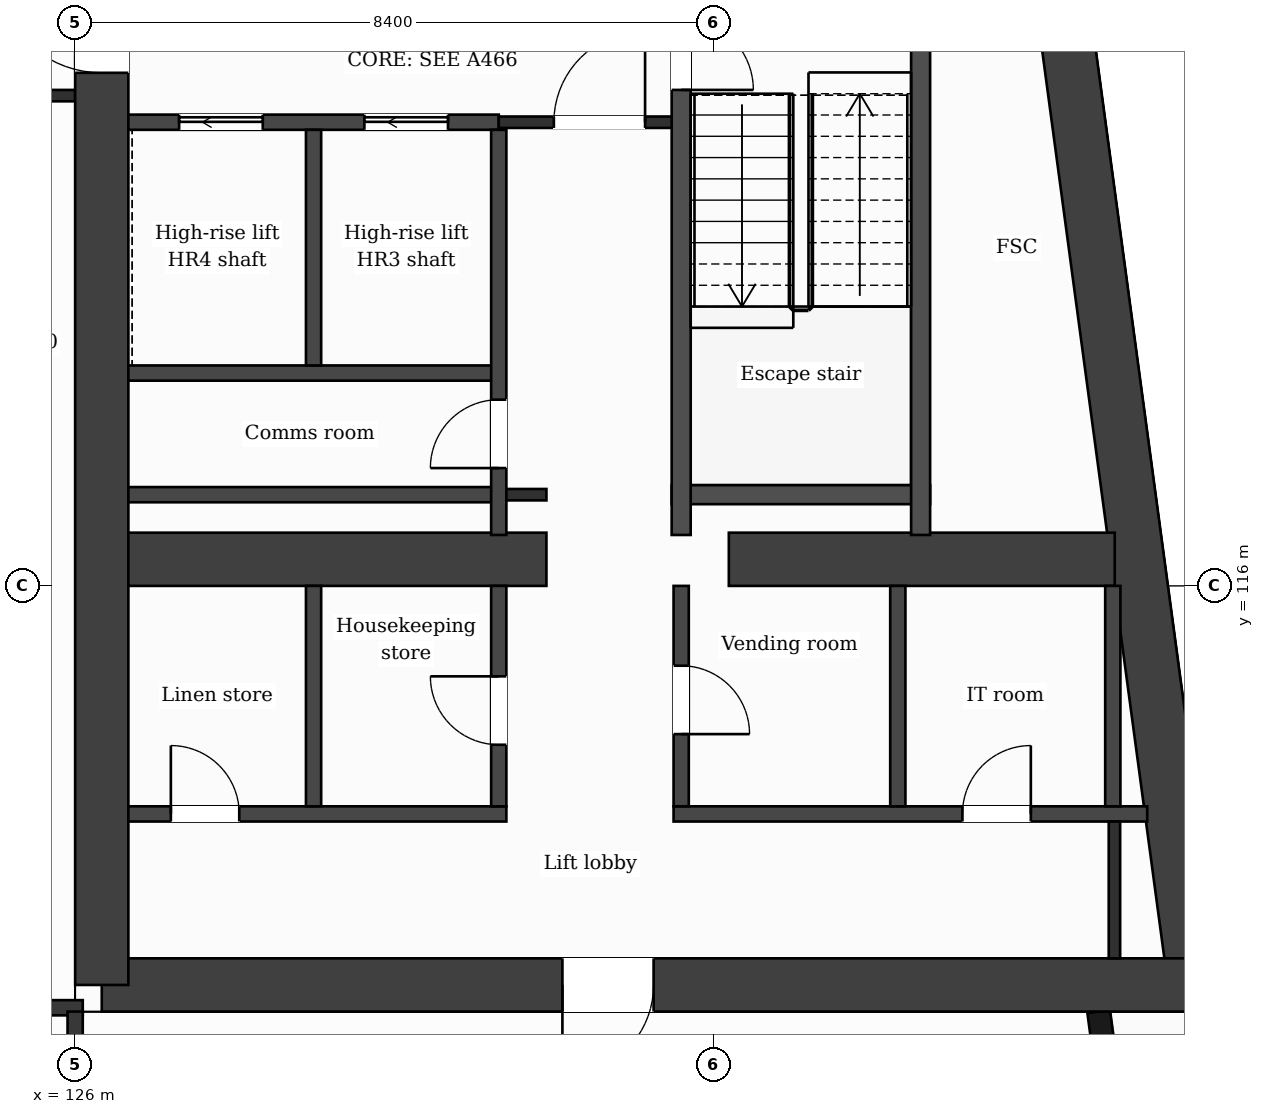
"""IFC4 building model, lengths in metres.
Left out: names, types, materials, properties, quantities, classifications, styles, units other than length and angle.
Written with IfcOpenShell. Run it as: python <this file> out.ifc"""

import sys

from ifc_helpers import new_model, si_unit, direction, frame, frame_2d, origin, place, context, subcontext, project, spatial, rectangle, extrude, element, fill, save


model = new_model("IFC4")
c1 = context("Model", 3, precision=1e-05, world=origin(), true_north=direction((0.0, 1.0)))
c2 = subcontext(c1, "Body", "Model", "MODEL_VIEW")
j1 = project(units=[si_unit("LENGTHUNIT", "METRE"), si_unit("PLANEANGLEUNIT", "RADIAN")], contexts=[c1])
p1 = place(None, origin())
s1 = spatial("IfcSite", under=j1, at=p1, CompositionType="ELEMENT")
p2 = place(p1, origin())
s2 = spatial("IfcBuilding", under=s1, at=p2, CompositionType="ELEMENT")
p3 = place(p2, frame((0.0, 0.0, 270.1)))
s3 = spatial("IfcBuildingStorey", under=s2, at=p3, CompositionType="ELEMENT", Elevation=270.1)
p4 = place(p3, frame((137.863, 132.05, 0.0), z_axis=(0.0, 0.0, 1.0), x_axis=(0.133406218907, -0.991061441464, 0.0)))
e1 = element("IfcWall", 1, at=p4, inside=s3, PredefinedType="SHEAR", context=c2, shape_type="SweptSolid", body=[
    extrude(rectangle(XDim=21.492, YDim=0.7, at=frame_2d((10.746, 0.0))), origin(), (0.0, 0.0, 1.0), 3.7),
])
p5 = place(p3, frame((140.73, 110.75, 0.0), z_axis=(0.0, 0.0, 1.0), x_axis=(-1.0, 0.0, 0.0)))
e2 = element("IfcWall", 2, at=p5, inside=s3, PredefinedType="SHEAR", context=c2, shape_type="SweptSolid", body=[
    extrude(rectangle(XDim=14.38, YDim=0.7, at=frame_2d((7.19, 0.0))), origin(), (0.0, 0.0, 1.0), 3.7),
])
p6 = place(p5, frame((7.12, 0.0, 0.0)))
e3 = element("IfcOpeningElement", 3, at=p6, cuts=e2, PredefinedType="OPENING", context=c2, shape_type="SweptSolid", body=[
    extrude(rectangle(XDim=1.2, YDim=2.1, at=frame_2d((0.6, 1.05))), frame((0.0, 0.36, 0.0), z_axis=(0.0, -1.0, 0.0), x_axis=(1.0, 0.0, 0.0)), (0.0, 0.0, 1.0), 0.72),
])
p7 = place(p3, frame((126.35, 110.75, 0.0), z_axis=(0.0, 0.0, 1.0), x_axis=(0.0, 1.0, 0.0)))
e4 = element("IfcWall", 4, at=p7, inside=s3, PredefinedType="SHEAR", context=c2, shape_type="SweptSolid", body=[
    extrude(rectangle(XDim=21.3, YDim=0.7, at=frame_2d((10.65, 0.0))), origin(), (0.0, 0.0, 1.0), 3.7),
])
p8 = place(p7, frame((12.0, 0.0, 0.0)))
e5 = element("IfcOpeningElement", 5, at=p8, cuts=e4, PredefinedType="OPENING", context=c2, shape_type="SweptSolid", body=[
    extrude(rectangle(XDim=1.4, YDim=2.1, at=frame_2d((0.7, 1.05))), frame((0.0, 0.36, 0.0), z_axis=(0.0, -1.0, 0.0), x_axis=(1.0, 0.0, 0.0)), (0.0, 0.0, 1.0), 0.72),
])
p9 = place(p3, frame((126.7, 116.35, 0.0), z_axis=(0.0, 0.0, 1.0), x_axis=(1.0, 0.0, 0.0)))
e6 = element("IfcWall", 6, at=p9, inside=s3, PredefinedType="SHEAR", context=c2, shape_type="SweptSolid", body=[
    extrude(rectangle(XDim=5.5, YDim=0.7, at=frame_2d((2.75, 0.0))), origin(), (0.0, 0.0, 1.0), 3.7),
])
p10 = place(p3, frame((134.6, 116.35, 0.0), z_axis=(0.0, 0.0, 1.0), x_axis=(1.0, 0.0, 0.0)))
e7 = element("IfcWall", 7, at=p10, inside=s3, PredefinedType="SHEAR", context=c2, shape_type="SweptSolid", body=[
    extrude(rectangle(XDim=5.077, YDim=0.7, at=frame_2d((2.539, 0.0))), origin(), (0.0, 0.0, 1.0), 3.7),
])
p11 = place(p3, frame((139.701, 108.65, 0.0), z_axis=(0.0, 0.0, 1.0), x_axis=(-0.133422458344, 0.991059255347, 0.0)))
e8 = element("IfcWall", 8, at=p11, inside=s3, PredefinedType="SOLIDWALL", context=c2, shape_type="SweptSolid", body=[
    extrude(rectangle(XDim=1.766, YDim=0.3, at=frame_2d((0.883, 0.0))), origin(), (0.0, 0.0, 1.0), 3.38),
])
p12 = place(p3, frame((100.7, 110.45, 0.0), z_axis=(0.0, 0.0, 1.0), x_axis=(1.0, 0.0, 0.0)))
e9 = element("IfcWall", 9, at=p12, inside=s3, PredefinedType="PARTITIONING", context=c2, shape_type="SweptSolid", body=[
    extrude(rectangle(XDim=25.4, YDim=0.2, at=frame_2d((12.7, 0.0))), origin(), (0.0, 0.0, 1.0), 3.38),
])
p13 = place(p3, frame((126.7, 113.0, 0.0), z_axis=(0.0, 0.0, 1.0), x_axis=(1.0, 0.0, 0.0)))
e10 = element("IfcWall", 10, at=p13, inside=s3, PredefinedType="PARTITIONING", context=c2, shape_type="SweptSolid", body=[
    extrude(rectangle(XDim=4.973, YDim=0.2, at=frame_2d((2.487, 0.0))), origin(), (0.0, 0.0, 1.0), 3.38),
])
p14 = place(p13, frame((0.559, 0.0, 0.0)))
e11 = element("IfcOpeningElement", 11, at=p14, cuts=e10, PredefinedType="OPENING", context=c2, shape_type="SweptSolid", body=[
    extrude(rectangle(XDim=0.9, YDim=2.1, at=frame_2d((0.45, 1.05))), frame((0.0, 0.11, 0.0), z_axis=(0.0, -1.0, 0.0), x_axis=(1.0, 0.0, 0.0)), (0.0, 0.0, 1.0), 0.22),
])
p15 = place(p3, frame((133.873, 113.0, 0.0), z_axis=(0.0, 0.0, 1.0), x_axis=(1.0, 0.0, 0.0)))
e12 = element("IfcWall", 12, at=p15, inside=s3, PredefinedType="PARTITIONING", context=c2, shape_type="SweptSolid", body=[
    extrude(rectangle(XDim=6.231, YDim=0.2, at=frame_2d((3.116, 0.0))), origin(), (0.0, 0.0, 1.0), 3.38),
])
p16 = place(p15, frame((3.8, 0.0, 0.0)))
e13 = element("IfcOpeningElement", 13, at=p16, cuts=e12, PredefinedType="OPENING", context=c2, shape_type="SweptSolid", body=[
    extrude(rectangle(XDim=0.9, YDim=2.1, at=frame_2d((0.45, 1.05))), frame((0.0, 0.11, 0.0), z_axis=(0.0, -1.0, 0.0), x_axis=(1.0, 0.0, 0.0)), (0.0, 0.0, 1.0), 0.22),
])
p17 = place(p3, frame((126.7, 117.2, 0.0), z_axis=(0.0, 0.0, 1.0), x_axis=(1.0, 0.0, 0.0)))
e14 = element("IfcWall", 14, at=p17, inside=s3, PredefinedType="PARTITIONING", context=c2, shape_type="SweptSolid", body=[
    extrude(rectangle(XDim=4.873, YDim=0.2, at=frame_2d((2.437, 0.0))), origin(), (0.0, 0.0, 1.0), 3.38),
])
p18 = place(p3, frame((131.573, 117.2, 0.0), z_axis=(0.0, 0.0, 1.0), x_axis=(1.0, 0.0, 0.0)))
e15 = element("IfcWall", 15, at=p18, inside=s3, PredefinedType="PARTITIONING", context=c2, shape_type="SweptSolid", body=[
    extrude(rectangle(XDim=0.627, YDim=0.15, at=frame_2d((0.313, 0.0))), origin(), (0.0, 0.0, 1.0), 3.38),
])
p19 = place(p3, frame((133.848, 117.2, 0.0), z_axis=(0.0, 0.0, 1.0), x_axis=(1.0, 0.0, 0.0)))
e16 = element("IfcWall", 16, at=p19, inside=s3, PredefinedType="PARTITIONING", context=c2, shape_type="SweptSolid", body=[
    extrude(rectangle(XDim=3.4, YDim=0.25, at=frame_2d((1.7, 0.0))), origin(), (0.0, 0.0, 1.0), 3.38),
])
p20 = place(p3, frame((126.7, 118.8, 0.0), z_axis=(0.0, 0.0, 1.0), x_axis=(1.0, 0.0, 0.0)))
e17 = element("IfcWall", 17, at=p20, inside=s3, PredefinedType="PARTITIONING", context=c2, shape_type="SweptSolid", body=[
    extrude(rectangle(XDim=4.873, YDim=0.2, at=frame_2d((2.437, 0.0))), origin(), (0.0, 0.0, 1.0), 3.38),
])
p21 = place(p3, frame((126.7, 122.1, 0.0), z_axis=(0.0, 0.0, 1.0), x_axis=(1.0, 0.0, 0.0)))
e18 = element("IfcWall", 18, at=p21, inside=s3, PredefinedType="PARTITIONING", context=c2, shape_type="SweptSolid", body=[
    extrude(rectangle(XDim=4.873, YDim=0.2, at=frame_2d((2.437, 0.0))), origin(), (0.0, 0.0, 1.0), 3.38),
])
p22 = place(p21, frame((3.105, 0.0, 0.0)))
e19 = element("IfcOpeningElement", 19, at=p22, cuts=e18, PredefinedType="OPENING", context=c2, shape_type="SweptSolid", body=[
    extrude(rectangle(XDim=1.1, YDim=2.1, at=frame_2d((0.55, 1.05))), frame((0.0, 0.11, 0.0), z_axis=(0.0, -1.0, 0.0), x_axis=(1.0, 0.0, 0.0)), (0.0, 0.0, 1.0), 0.22),
])
p23 = place(p21, frame((0.668, 0.0, 0.0)))
e20 = element("IfcOpeningElement", 20, at=p23, cuts=e18, PredefinedType="OPENING", context=c2, shape_type="SweptSolid", body=[
    extrude(rectangle(XDim=1.1, YDim=2.1, at=frame_2d((0.55, 1.05))), frame((0.0, 0.11, 0.0), z_axis=(0.0, -1.0, 0.0), x_axis=(1.0, 0.0, 0.0)), (0.0, 0.0, 1.0), 0.22),
])
p24 = place(p3, frame((131.573, 122.1, 0.0), z_axis=(0.0, 0.0, 1.0), x_axis=(1.0, 0.0, 0.0)))
e21 = element("IfcWall", 21, at=p24, inside=s3, PredefinedType="PARTITIONING", context=c2, shape_type="SweptSolid", body=[
    extrude(rectangle(XDim=2.4, YDim=0.15, at=frame_2d((1.2, 0.0))), origin(), (0.0, 0.0, 1.0), 3.38),
])
p25 = place(p24, frame((0.725, 0.0, 0.0)))
e22 = element("IfcOpeningElement", 22, at=p25, cuts=e21, PredefinedType="OPENING", context=c2, shape_type="SweptSolid", body=[
    extrude(rectangle(XDim=1.2, YDim=2.1, at=frame_2d((0.6, 1.05))), frame((0.0, 0.085, 0.0), z_axis=(0.0, -1.0, 0.0), x_axis=(1.0, 0.0, 0.0)), (0.0, 0.0, 1.0), 0.17),
])
p26 = place(p3, frame((100.8, 122.45, 0.0), z_axis=(0.0, 0.0, 1.0), x_axis=(1.0, 0.0, 0.0)))
e23 = element("IfcWall", 23, at=p26, inside=s3, PredefinedType="PARTITIONING", context=c2, shape_type="SweptSolid", body=[
    extrude(rectangle(XDim=25.2, YDim=0.15, at=frame_2d((12.6, 0.0))), origin(), (0.0, 0.0, 1.0), 3.38),
])
p27 = place(p26, frame((5.55, 0.0, 0.0)))
e24 = element("IfcOpeningElement", 24, at=p27, cuts=e23, PredefinedType="OPENING", context=c2, shape_type="SweptSolid", body=[
    extrude(rectangle(XDim=1.0, YDim=2.1, at=frame_2d((0.5, 1.05))), frame((0.0, 0.085, 0.0), z_axis=(0.0, -1.0, 0.0), x_axis=(1.0, 0.0, 0.0)), (0.0, 0.0, 1.0), 0.17),
])
p28 = place(p26, frame((8.862, 0.0, 0.0)))
e25 = element("IfcOpeningElement", 25, at=p28, cuts=e23, PredefinedType="OPENING", context=c2, shape_type="SweptSolid", body=[
    extrude(rectangle(XDim=0.95, YDim=2.1, at=frame_2d((0.475, 1.05))), frame((0.0, 0.085, 0.0), z_axis=(0.0, -1.0, 0.0), x_axis=(1.0, 0.0, 0.0)), (0.0, 0.0, 1.0), 0.17),
])
p29 = place(p26, frame((15.2, 0.0, 0.0)))
e26 = element("IfcOpeningElement", 26, at=p29, cuts=e23, PredefinedType="OPENING", context=c2, shape_type="SweptSolid", body=[
    extrude(rectangle(XDim=0.95, YDim=2.1, at=frame_2d((0.475, 1.05))), frame((0.0, 0.085, 0.0), z_axis=(0.0, -1.0, 0.0), x_axis=(1.0, 0.0, 0.0)), (0.0, 0.0, 1.0), 0.17),
])
p30 = place(p26, frame((17.325, 0.0, 0.0)))
e27 = element("IfcOpeningElement", 27, at=p30, cuts=e23, PredefinedType="OPENING", context=c2, shape_type="SweptSolid", body=[
    extrude(rectangle(XDim=1.0, YDim=2.1, at=frame_2d((0.5, 1.05))), frame((0.0, 0.085, 0.0), z_axis=(0.0, -1.0, 0.0), x_axis=(1.0, 0.0, 0.0)), (0.0, 0.0, 1.0), 0.17),
])
p31 = place(p26, frame((23.862, 0.0, 0.0)))
e28 = element("IfcOpeningElement", 28, at=p31, cuts=e23, PredefinedType="OPENING", context=c2, shape_type="SweptSolid", body=[
    extrude(rectangle(XDim=0.95, YDim=2.1, at=frame_2d((0.475, 1.05))), frame((0.0, 0.085, 0.0), z_axis=(0.0, -1.0, 0.0), x_axis=(1.0, 0.0, 0.0)), (0.0, 0.0, 1.0), 0.17),
])
p32 = place(p3, frame((126.0, 108.79, 0.0), z_axis=(0.0, 0.0, 1.0), x_axis=(0.0, 1.0, 0.0)))
e29 = element("IfcWall", 29, at=p32, inside=s3, PredefinedType="PARTITIONING", context=c2, shape_type="SweptSolid", body=[
    extrude(rectangle(XDim=1.61, YDim=0.2, at=frame_2d((0.805, 0.0))), origin(), (0.0, 0.0, 1.0), 3.38),
])
p33 = place(p3, frame((129.136, 113.1, 0.0), z_axis=(0.0, 0.0, 1.0), x_axis=(0.0, 1.0, 0.0)))
e30 = element("IfcWall", 30, at=p33, inside=s3, PredefinedType="PARTITIONING", context=c2, shape_type="SweptSolid", body=[
    extrude(rectangle(XDim=2.9, YDim=0.2, at=frame_2d((1.45, 0.0))), origin(), (0.0, 0.0, 1.0), 3.38),
])
p34 = place(p3, frame((129.136, 118.9, 0.0), z_axis=(0.0, 0.0, 1.0), x_axis=(0.0, 1.0, 0.0)))
e31 = element("IfcWall", 31, at=p34, inside=s3, PredefinedType="PARTITIONING", context=c2, shape_type="SweptSolid", body=[
    extrude(rectangle(XDim=3.1, YDim=0.2, at=frame_2d((1.55, 0.0))), origin(), (0.0, 0.0, 1.0), 3.38),
])
p35 = place(p3, frame((131.573, 113.1, 0.0), z_axis=(0.0, 0.0, 1.0), x_axis=(0.0, 1.0, 0.0)))
e32 = element("IfcWall", 32, at=p35, inside=s3, PredefinedType="PARTITIONING", context=c2, shape_type="SweptSolid", body=[
    extrude(rectangle(XDim=2.9, YDim=0.2, at=frame_2d((1.45, 0.0))), origin(), (0.0, 0.0, 1.0), 3.38),
])
p36 = place(p35, frame((0.81, 0.0, 0.0)))
e33 = element("IfcOpeningElement", 33, at=p36, cuts=e32, PredefinedType="OPENING", context=c2, shape_type="SweptSolid", body=[
    extrude(rectangle(XDim=0.9, YDim=2.1, at=frame_2d((0.45, 1.05))), frame((0.0, 0.11, 0.0), z_axis=(0.0, -1.0, 0.0), x_axis=(1.0, 0.0, 0.0)), (0.0, 0.0, 1.0), 0.22),
])
p37 = place(p3, frame((131.573, 116.67, 0.0), z_axis=(0.0, 0.0, 1.0), x_axis=(0.0, 1.0, 0.0)))
e34 = element("IfcWall", 34, at=p37, inside=s3, PredefinedType="PARTITIONING", context=c2, shape_type="SweptSolid", body=[
    extrude(rectangle(XDim=5.33, YDim=0.2, at=frame_2d((2.665, 0.0))), origin(), (0.0, 0.0, 1.0), 3.38),
])
p38 = place(p37, frame((0.88, 0.0, 0.0)))
e35 = element("IfcOpeningElement", 35, at=p38, cuts=e34, PredefinedType="OPENING", context=c2, shape_type="SweptSolid", body=[
    extrude(rectangle(XDim=0.9, YDim=2.1, at=frame_2d((0.45, 1.05))), frame((0.0, 0.11, 0.0), z_axis=(0.0, -1.0, 0.0), x_axis=(1.0, 0.0, 0.0)), (0.0, 0.0, 1.0), 0.22),
])
p39 = place(p3, frame((133.973, 113.1, 0.0), z_axis=(0.0, 0.0, 1.0), x_axis=(0.0, 1.0, 0.0)))
e36 = element("IfcWall", 36, at=p39, inside=s3, PredefinedType="PARTITIONING", context=c2, shape_type="SweptSolid", body=[
    extrude(rectangle(XDim=2.9, YDim=0.2, at=frame_2d((1.45, 0.0))), origin(), (0.0, 0.0, 1.0), 3.38),
])
p40 = place(p39, frame((0.95, 0.0, 0.0)))
e37 = element("IfcOpeningElement", 37, at=p40, cuts=e36, PredefinedType="OPENING", context=c2, shape_type="SweptSolid", body=[
    extrude(rectangle(XDim=0.9, YDim=2.1, at=frame_2d((0.45, 1.05))), frame((0.0, 0.11, 0.0), z_axis=(0.0, -1.0, 0.0), x_axis=(1.0, 0.0, 0.0)), (0.0, 0.0, 1.0), 0.22),
])
p41 = place(p3, frame((133.973, 116.67, 0.0), z_axis=(0.0, 0.0, 1.0), x_axis=(0.0, 1.0, 0.0)))
e38 = element("IfcWall", 38, at=p41, inside=s3, PredefinedType="PARTITIONING", context=c2, shape_type="SweptSolid", body=[
    extrude(rectangle(XDim=7.155, YDim=0.25, at=frame_2d((3.578, 0.0))), origin(), (0.0, 0.0, 1.0), 3.38),
])
p42 = place(p41, frame((5.855, 0.0, 0.0)))
e39 = element("IfcOpeningElement", 39, at=p42, cuts=e38, PredefinedType="OPENING", context=c2, shape_type="SweptSolid", body=[
    extrude(rectangle(XDim=0.95, YDim=2.1, at=frame_2d((0.475, 1.05))), frame((0.0, 0.135, 0.0), z_axis=(0.0, -1.0, 0.0), x_axis=(1.0, 0.0, 0.0)), (0.0, 0.0, 1.0), 0.27),
])
p43 = place(p3, frame((136.823, 113.1, 0.0), z_axis=(0.0, 0.0, 1.0), x_axis=(0.0, 1.0, 0.0)))
e40 = element("IfcWall", 40, at=p43, inside=s3, PredefinedType="PARTITIONING", context=c2, shape_type="SweptSolid", body=[
    extrude(rectangle(XDim=2.9, YDim=0.2, at=frame_2d((1.45, 0.0))), origin(), (0.0, 0.0, 1.0), 3.38),
])
p44 = place(p3, frame((137.123, 116.67, 0.0), z_axis=(0.0, 0.0, 1.0), x_axis=(0.0, 1.0, 0.0)))
e41 = element("IfcWall", 41, at=p44, inside=s3, PredefinedType="PARTITIONING", context=c2, shape_type="SweptSolid", body=[
    extrude(rectangle(XDim=7.155, YDim=0.25, at=frame_2d((3.578, 0.0))), origin(), (0.0, 0.0, 1.0), 3.38),
])
p45 = place(p3, frame((139.652, 113.1, 0.0), z_axis=(0.0, 0.0, 1.0), x_axis=(0.0, 1.0, 0.0)))
e42 = element("IfcWall", 42, at=p45, inside=s3, PredefinedType="PARTITIONING", context=c2, shape_type="SweptSolid", body=[
    extrude(rectangle(XDim=2.9, YDim=0.2, at=frame_2d((1.45, 0.0))), origin(), (0.0, 0.0, 1.0), 3.38),
])
p46 = place(p3, frame((139.673, 111.1, 0.0), z_axis=(0.0, 0.0, 1.0), x_axis=(0.0, 1.0, 0.0)))
e43 = element("IfcWall", 43, at=p46, inside=s3, PredefinedType="PARTITIONING", context=c2, shape_type="SweptSolid", body=[
    extrude(rectangle(XDim=1.8, YDim=0.15, at=frame_2d((0.9, 0.0))), origin(), (0.0, 0.0, 1.0), 3.38),
])
p47 = place(p25, origin())
e44 = element("IfcDoor", 44, at=p47, inside=s3, OperationType="SINGLE_SWING_RIGHT", PredefinedType="DOOR", context=c2, shape_type="SweptSolid", body=[
    extrude(rectangle(XDim=1.2, YDim=2.1, at=frame_2d((0.6, 1.05))), frame((0.0, 0.025, 0.0), z_axis=(0.0, -1.0, 0.0), x_axis=(1.0, 0.0, 0.0)), (0.0, 0.0, 1.0), 0.05),
])
fill(e22, e44)
p48 = place(p22, origin())
e45 = element("IfcDoor", 45, at=p48, inside=s3, OperationType="SLIDING_TO_LEFT", PredefinedType="DOOR", context=c2, shape_type="SweptSolid", body=[
    extrude(rectangle(XDim=1.1, YDim=2.1, at=frame_2d((0.55, 1.05))), frame((0.0, 0.025, 0.0), z_axis=(0.0, -1.0, 0.0), x_axis=(1.0, 0.0, 0.0)), (0.0, 0.0, 1.0), 0.05),
])
fill(e19, e45)
p49 = place(p23, origin())
e46 = element("IfcDoor", 46, at=p49, inside=s3, OperationType="SLIDING_TO_LEFT", PredefinedType="DOOR", context=c2, shape_type="SweptSolid", body=[
    extrude(rectangle(XDim=1.1, YDim=2.1, at=frame_2d((0.55, 1.05))), frame((0.0, 0.025, 0.0), z_axis=(0.0, -1.0, 0.0), x_axis=(1.0, 0.0, 0.0)), (0.0, 0.0, 1.0), 0.05),
])
fill(e20, e46)
p50 = place(p42, origin())
e47 = element("IfcDoor", 47, at=p50, inside=s3, OperationType="SINGLE_SWING_LEFT", PredefinedType="DOOR", context=c2, shape_type="SweptSolid", body=[
    extrude(rectangle(XDim=0.95, YDim=2.1, at=frame_2d((0.475, 1.05))), frame((0.0, 0.025, 0.0), z_axis=(0.0, -1.0, 0.0), x_axis=(1.0, 0.0, 0.0)), (0.0, 0.0, 1.0), 0.05),
])
fill(e39, e47)
p51 = place(p38, origin())
e48 = element("IfcDoor", 48, at=p51, inside=s3, OperationType="SINGLE_SWING_LEFT", PredefinedType="DOOR", context=c2, shape_type="SweptSolid", body=[
    extrude(rectangle(XDim=0.9, YDim=2.1, at=frame_2d((0.45, 1.05))), frame((0.0, 0.025, 0.0), z_axis=(0.0, -1.0, 0.0), x_axis=(1.0, 0.0, 0.0)), (0.0, 0.0, 1.0), 0.05),
])
fill(e35, e48)
p52 = place(p16, origin())
e49 = element("IfcDoor", 49, at=p52, inside=s3, OperationType="SINGLE_SWING_RIGHT", PredefinedType="DOOR", context=c2, shape_type="SweptSolid", body=[
    extrude(rectangle(XDim=0.9, YDim=2.1, at=frame_2d((0.45, 1.05))), frame((0.0, 0.025, 0.0), z_axis=(0.0, -1.0, 0.0), x_axis=(1.0, 0.0, 0.0)), (0.0, 0.0, 1.0), 0.05),
])
fill(e13, e49)
p53 = place(p40, origin())
e50 = element("IfcDoor", 50, at=p53, inside=s3, OperationType="SINGLE_SWING_LEFT", PredefinedType="DOOR", context=c2, shape_type="SweptSolid", body=[
    extrude(rectangle(XDim=0.9, YDim=2.1, at=frame_2d((0.45, 1.05))), frame((0.0, 0.025, 0.0), z_axis=(0.0, -1.0, 0.0), x_axis=(1.0, 0.0, 0.0)), (0.0, 0.0, 1.0), 0.05),
])
fill(e37, e50)
p54 = place(p36, origin())
e51 = element("IfcDoor", 51, at=p54, inside=s3, OperationType="SINGLE_SWING_RIGHT", PredefinedType="DOOR", context=c2, shape_type="SweptSolid", body=[
    extrude(rectangle(XDim=0.9, YDim=2.1, at=frame_2d((0.45, 1.05))), frame((0.0, 0.025, 0.0), z_axis=(0.0, -1.0, 0.0), x_axis=(1.0, 0.0, 0.0)), (0.0, 0.0, 1.0), 0.05),
])
fill(e33, e51)
p55 = place(p14, origin())
e52 = element("IfcDoor", 52, at=p55, inside=s3, OperationType="SINGLE_SWING_LEFT", PredefinedType="DOOR", context=c2, shape_type="SweptSolid", body=[
    extrude(rectangle(XDim=0.9, YDim=2.1, at=frame_2d((0.45, 1.05))), frame((0.0, 0.025, 0.0), z_axis=(0.0, -1.0, 0.0), x_axis=(1.0, 0.0, 0.0)), (0.0, 0.0, 1.0), 0.05),
])
fill(e11, e52)
p56 = place(p6, origin())
e53 = element("IfcDoor", 53, at=p56, inside=s3, OperationType="SINGLE_SWING_RIGHT", PredefinedType="DOOR", context=c2, shape_type="SweptSolid", body=[
    extrude(rectangle(XDim=1.2, YDim=2.1, at=frame_2d((0.6, 1.05))), frame((0.0, 0.025, 0.0), z_axis=(0.0, -1.0, 0.0), x_axis=(1.0, 0.0, 0.0)), (0.0, 0.0, 1.0), 0.05),
])
fill(e3, e53)
p57 = place(p8, origin())
e54 = element("IfcDoor", 54, at=p57, inside=s3, OperationType="SINGLE_SWING_RIGHT", PredefinedType="DOOR", context=c2, shape_type="SweptSolid", body=[
    extrude(rectangle(XDim=1.4, YDim=2.1, at=frame_2d((0.7, 1.05))), frame((0.0, 0.025, 0.0), z_axis=(0.0, -1.0, 0.0), x_axis=(1.0, 0.0, 0.0)), (0.0, 0.0, 1.0), 0.05),
])
fill(e5, e54)
save(model, sys.argv[1])
